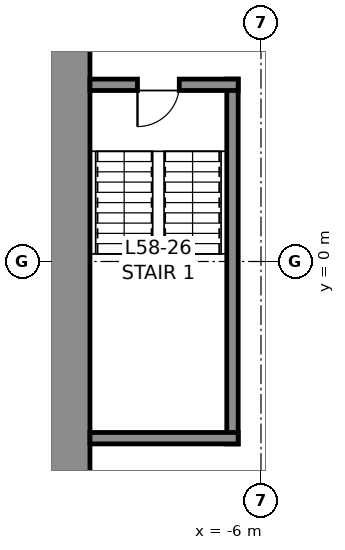
"""IFC4 building model, lengths in metres.
Left out: names, types, materials, properties, quantities, classifications, styles, units other than length and angle.
Written with IfcOpenShell. Run it as: python <this file> out.ifc"""

import sys

from ifc_helpers import new_model, si_unit, direction, frame, frame_2d, origin, place, context, subcontext, project, spatial, rectangle, extrude, element, fill, save


model = new_model("IFC4")
c1 = context("Model", 3, precision=1e-05, world=origin(), true_north=direction((0.0, 1.0)))
c2 = subcontext(c1, "Body", "Model", "MODEL_VIEW")
j1 = project(units=[si_unit("LENGTHUNIT", "METRE"), si_unit("PLANEANGLEUNIT", "RADIAN")], contexts=[c1])
p1 = place(None, origin())
s1 = spatial("IfcSite", under=j1, at=p1, CompositionType="ELEMENT")
p2 = place(p1, origin())
s2 = spatial("IfcBuilding", under=s1, at=p2, CompositionType="ELEMENT")
p3 = place(p2, frame((0.0, 0.0, 261.8)))
s3 = spatial("IfcBuildingStorey", under=s2, at=p3, CompositionType="ELEMENT", Elevation=261.8)
p4 = place(p3, frame((-11.25, -10.5, 0.0), z_axis=(0.0, 0.0, 1.0), x_axis=(0.0, 1.0, 0.0)))
e1 = element("IfcWall", 1, at=p4, inside=s3, PredefinedType="SHEAR", context=c2, shape_type="SweptSolid", body=[
    extrude(rectangle(XDim=21.0, YDim=1.5, at=frame_2d((10.5, 0.0))), origin(), (0.0, 0.0, 1.0), 4.0),
])
p5 = place(p4, frame((16.1, 0.0, 0.0)))
e2 = element("IfcOpeningElement", 2, at=p5, cuts=e1, PredefinedType="OPENING", context=c2, shape_type="SweptSolid", body=[
    extrude(rectangle(XDim=1.2, YDim=2.3, at=frame_2d((0.6, 1.15))), frame((0.0, 0.76, 0.0), z_axis=(0.0, -1.0, 0.0), x_axis=(1.0, 0.0, 0.0)), (0.0, 0.0, 1.0), 1.52),
])
p6 = place(p4, frame((3.7, 0.0, 0.0)))
e3 = element("IfcOpeningElement", 3, at=p6, cuts=e1, PredefinedType="OPENING", context=c2, shape_type="SweptSolid", body=[
    extrude(rectangle(XDim=1.2, YDim=2.3, at=frame_2d((0.6, 1.15))), frame((0.0, 0.76, 0.0), z_axis=(0.0, -1.0, 0.0), x_axis=(1.0, 0.0, 0.0)), (0.0, 0.0, 1.0), 1.52),
])
p7 = place(p3, frame((-6.75, -4.8, 0.0), z_axis=(0.0, 0.0, 1.0), x_axis=(0.0, 1.0, 0.0)))
e4 = element("IfcWall", 4, at=p7, inside=s3, PredefinedType="SOLIDWALL", context=c2, shape_type="SweptSolid", body=[
    extrude(rectangle(XDim=9.6, YDim=0.3, at=frame_2d((4.8, 0.0))), origin(), (0.0, 0.0, 1.0), 3.75),
])
p8 = place(p3, frame((-10.5, 4.65, 0.0), z_axis=(0.0, 0.0, 1.0), x_axis=(1.0, 0.0, 0.0)))
e5 = element("IfcWall", 5, at=p8, inside=s3, PredefinedType="SOLIDWALL", context=c2, shape_type="SweptSolid", body=[
    extrude(rectangle(XDim=3.9, YDim=0.3, at=frame_2d((1.95, 0.0))), origin(), (0.0, 0.0, 1.0), 3.75),
])
p9 = place(p8, frame((1.25, 0.0, 0.0)))
e6 = element("IfcOpeningElement", 6, at=p9, cuts=e5, PredefinedType="OPENING", context=c2, shape_type="SweptSolid", body=[
    extrude(rectangle(XDim=1.1, YDim=2.3, at=frame_2d((0.55, 1.15))), frame((0.0, 0.16, 0.0), z_axis=(0.0, -1.0, 0.0), x_axis=(1.0, 0.0, 0.0)), (0.0, 0.0, 1.0), 0.32),
])
p10 = place(p3, frame((-6.6, -4.65, 0.0), z_axis=(0.0, 0.0, 1.0), x_axis=(-1.0, 0.0, 0.0)))
e7 = element("IfcWall", 7, at=p10, inside=s3, PredefinedType="SOLIDWALL", context=c2, shape_type="SweptSolid", body=[
    extrude(rectangle(XDim=3.9, YDim=0.3, at=frame_2d((1.95, 0.0))), origin(), (0.0, 0.0, 1.0), 3.75),
])
p11 = place(p9, frame((1.1, 0.0, 0.0), z_axis=(0.0, 0.0, 1.0), x_axis=(-1.0, 0.0, 0.0)))
e8 = element("IfcDoor", 8, at=p11, inside=s3, OperationType="SINGLE_SWING_RIGHT", PredefinedType="DOOR", context=c2, shape_type="SweptSolid", body=[
    extrude(rectangle(XDim=1.1, YDim=2.3, at=frame_2d((0.55, 1.15))), frame((0.0, 0.025, 0.0), z_axis=(0.0, -1.0, 0.0), x_axis=(1.0, 0.0, 0.0)), (0.0, 0.0, 1.0), 0.05),
])
fill(e6, e8)
save(model, sys.argv[1])
